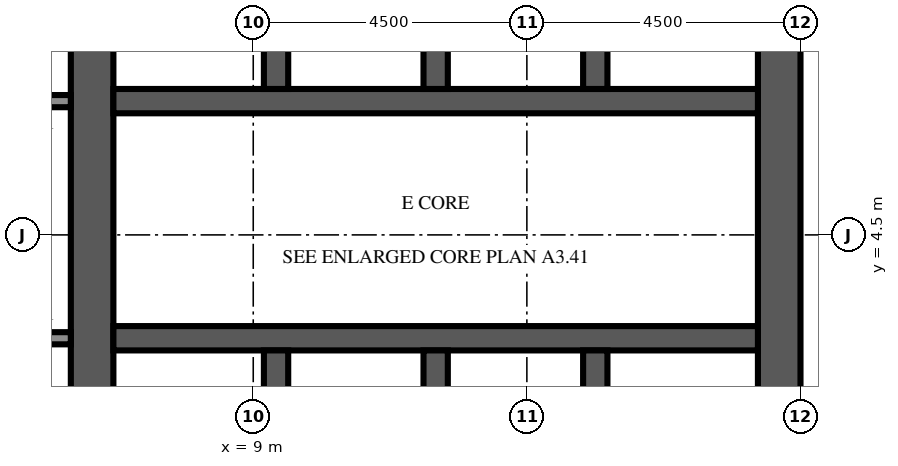
"""IFC4 building model, lengths in metres.
Left out: names, types, materials, properties, quantities, classifications, styles, units other than length and angle.
Written with IfcOpenShell. Run it as: python <this file> out.ifc"""

import sys

from ifc_helpers import new_model, si_unit, direction, frame, frame_2d, origin, place, context, subcontext, project, spatial, rectangle, extrude, element, fill, save


model = new_model("IFC4")
c1 = context("Model", 3, precision=1e-05, world=origin(), true_north=direction((0.0, 1.0)))
c2 = subcontext(c1, "Body", "Model", "MODEL_VIEW")
j1 = project(units=[si_unit("LENGTHUNIT", "METRE"), si_unit("PLANEANGLEUNIT", "RADIAN")], contexts=[c1])
p1 = place(None, origin())
s1 = spatial("IfcSite", under=j1, at=p1, CompositionType="ELEMENT")
p2 = place(p1, origin())
s2 = spatial("IfcBuilding", under=s1, at=p2, CompositionType="ELEMENT")
p3 = place(p2, frame((0.0, 0.0, 282.7)))
s3 = spatial("IfcBuildingStorey", under=s2, at=p3, CompositionType="ELEMENT", Elevation=282.7)
p4 = place(p3, frame((6.35, -9.0, 0.0), z_axis=(0.0, 0.0, 1.0), x_axis=(0.0, 1.0, 0.0)))
e1 = element("IfcWall", 1, at=p4, inside=s3, PredefinedType="SHEAR", context=c2, shape_type="SweptSolid", body=[
    extrude(rectangle(XDim=27.5, YDim=0.7, at=frame_2d((13.75, 0.0))), origin(), (0.0, 0.0, 1.0), 4.1),
])
p5 = place(p4, frame((12.55, 0.0, 0.0)))
e2 = element("IfcOpeningElement", 2, at=p5, cuts=e1, PredefinedType="OPENING", context=c2, shape_type="SweptSolid", body=[
    extrude(rectangle(XDim=2.4, YDim=2.4, at=frame_2d((1.2, 1.2))), frame((0.0, 0.36, 0.0), z_axis=(0.0, -1.0, 0.0), x_axis=(1.0, 0.0, 0.0)), (0.0, 0.0, 1.0), 0.72),
])
p6 = place(p4, frame((3.9, 0.0, 0.0)))
e3 = element("IfcOpeningElement", 3, at=p6, cuts=e1, PredefinedType="OPENING", context=c2, shape_type="SweptSolid", body=[
    extrude(rectangle(XDim=1.2, YDim=2.1, at=frame_2d((0.6, 1.05))), frame((0.0, 0.36, 0.0), z_axis=(0.0, -1.0, 0.0), x_axis=(1.0, 0.0, 0.0)), (0.0, 0.0, 1.0), 0.72),
])
p7 = place(p4, frame((22.4, 0.0, 0.0)))
e4 = element("IfcOpeningElement", 4, at=p7, cuts=e1, PredefinedType="OPENING", context=c2, shape_type="SweptSolid", body=[
    extrude(rectangle(XDim=1.2, YDim=2.1, at=frame_2d((0.6, 1.05))), frame((0.0, 0.36, 0.0), z_axis=(0.0, -1.0, 0.0), x_axis=(1.0, 0.0, 0.0)), (0.0, 0.0, 1.0), 0.72),
])
p8 = place(p3, frame((17.65, -9.0, 0.0), z_axis=(0.0, 0.0, 1.0), x_axis=(0.0, 1.0, 0.0)))
e5 = element("IfcWall", 5, at=p8, inside=s3, PredefinedType="SHEAR", context=c2, shape_type="SweptSolid", body=[
    extrude(rectangle(XDim=27.5, YDim=0.7, at=frame_2d((13.75, 0.0))), origin(), (0.0, 0.0, 1.0), 4.1),
])
p9 = place(p8, frame((12.55, 0.0, 0.0)))
e6 = element("IfcOpeningElement", 6, at=p9, cuts=e5, PredefinedType="OPENING", context=c2, shape_type="SweptSolid", body=[
    extrude(rectangle(XDim=2.4, YDim=2.4, at=frame_2d((1.2, 1.2))), frame((0.0, 0.36, 0.0), z_axis=(0.0, -1.0, 0.0), x_axis=(1.0, 0.0, 0.0)), (0.0, 0.0, 1.0), 0.72),
])
p10 = place(p8, frame((6.825, 0.0, 0.0)))
e7 = element("IfcOpeningElement", 7, at=p10, cuts=e5, PredefinedType="OPENING", context=c2, shape_type="SweptSolid", body=[
    extrude(rectangle(XDim=1.2, YDim=2.1, at=frame_2d((0.6, 1.05))), frame((0.0, 0.36, 0.0), z_axis=(0.0, -1.0, 0.0), x_axis=(1.0, 0.0, 0.0)), (0.0, 0.0, 1.0), 0.72),
])
p11 = place(p8, frame((19.475, 0.0, 0.0)))
e8 = element("IfcOpeningElement", 8, at=p11, cuts=e5, PredefinedType="OPENING", context=c2, shape_type="SweptSolid", body=[
    extrude(rectangle(XDim=1.2, YDim=2.1, at=frame_2d((0.6, 1.05))), frame((0.0, 0.36, 0.0), z_axis=(0.0, -1.0, 0.0), x_axis=(1.0, 0.0, 0.0)), (0.0, 0.0, 1.0), 0.72),
])
p12 = place(p3, frame((6.7, 2.8, 0.0), z_axis=(0.0, 0.0, 1.0), x_axis=(1.0, 0.0, 0.0)))
e9 = element("IfcWall", 9, at=p12, inside=s3, PredefinedType="SHEAR", context=c2, shape_type="SweptSolid", body=[
    extrude(rectangle(XDim=10.6, YDim=0.4, at=frame_2d((5.3, 0.0))), origin(), (0.0, 0.0, 1.0), 4.1),
])
p13 = place(p12, frame((0.688, 0.0, 0.0)))
e10 = element("IfcOpeningElement", 10, at=p13, cuts=e9, PredefinedType="OPENING", context=c2, shape_type="SweptSolid", body=[
    extrude(rectangle(XDim=1.1, YDim=2.1, at=frame_2d((0.55, 1.05))), frame((0.0, 0.21, 0.0), z_axis=(0.0, -1.0, 0.0), x_axis=(1.0, 0.0, 0.0)), (0.0, 0.0, 1.0), 0.42),
])
p14 = place(p12, frame((3.438, 0.0, 0.0)))
e11 = element("IfcOpeningElement", 11, at=p14, cuts=e9, PredefinedType="OPENING", context=c2, shape_type="SweptSolid", body=[
    extrude(rectangle(XDim=1.1, YDim=2.1, at=frame_2d((0.55, 1.05))), frame((0.0, 0.21, 0.0), z_axis=(0.0, -1.0, 0.0), x_axis=(1.0, 0.0, 0.0)), (0.0, 0.0, 1.0), 0.42),
])
p15 = place(p12, frame((6.113, 0.0, 0.0)))
e12 = element("IfcOpeningElement", 12, at=p15, cuts=e9, PredefinedType="OPENING", context=c2, shape_type="SweptSolid", body=[
    extrude(rectangle(XDim=1.0, YDim=2.1, at=frame_2d((0.5, 1.05))), frame((0.0, 0.21, 0.0), z_axis=(0.0, -1.0, 0.0), x_axis=(1.0, 0.0, 0.0)), (0.0, 0.0, 1.0), 0.42),
])
p16 = place(p12, frame((8.863, 0.0, 0.0)))
e13 = element("IfcOpeningElement", 13, at=p16, cuts=e9, PredefinedType="OPENING", context=c2, shape_type="SweptSolid", body=[
    extrude(rectangle(XDim=1.0, YDim=2.1, at=frame_2d((0.5, 1.05))), frame((0.0, 0.21, 0.0), z_axis=(0.0, -1.0, 0.0), x_axis=(1.0, 0.0, 0.0)), (0.0, 0.0, 1.0), 0.42),
])
p17 = place(p3, frame((6.7, 6.7, 0.0), z_axis=(0.0, 0.0, 1.0), x_axis=(1.0, 0.0, 0.0)))
e14 = element("IfcWall", 14, at=p17, inside=s3, PredefinedType="SHEAR", context=c2, shape_type="SweptSolid", body=[
    extrude(rectangle(XDim=10.6, YDim=0.4, at=frame_2d((5.3, 0.0))), origin(), (0.0, 0.0, 1.0), 4.1),
])
p18 = place(p17, frame((3.438, 0.0, 0.0)))
e15 = element("IfcOpeningElement", 15, at=p18, cuts=e14, PredefinedType="OPENING", context=c2, shape_type="SweptSolid", body=[
    extrude(rectangle(XDim=1.1, YDim=2.1, at=frame_2d((0.55, 1.05))), frame((0.0, 0.21, 0.0), z_axis=(0.0, -1.0, 0.0), x_axis=(1.0, 0.0, 0.0)), (0.0, 0.0, 1.0), 0.42),
])
p19 = place(p17, frame((6.062, 0.0, 0.0)))
e16 = element("IfcOpeningElement", 16, at=p19, cuts=e14, PredefinedType="OPENING", context=c2, shape_type="SweptSolid", body=[
    extrude(rectangle(XDim=1.1, YDim=2.1, at=frame_2d((0.55, 1.05))), frame((0.0, 0.21, 0.0), z_axis=(0.0, -1.0, 0.0), x_axis=(1.0, 0.0, 0.0)), (0.0, 0.0, 1.0), 0.42),
])
p20 = place(p17, frame((8.812, 0.0, 0.0)))
e17 = element("IfcOpeningElement", 17, at=p20, cuts=e14, PredefinedType="OPENING", context=c2, shape_type="SweptSolid", body=[
    extrude(rectangle(XDim=1.1, YDim=2.1, at=frame_2d((0.55, 1.05))), frame((0.0, 0.21, 0.0), z_axis=(0.0, -1.0, 0.0), x_axis=(1.0, 0.0, 0.0)), (0.0, 0.0, 1.0), 0.42),
])
p21 = place(p17, frame((0.738, 0.0, 0.0)))
e18 = element("IfcOpeningElement", 18, at=p21, cuts=e14, PredefinedType="OPENING", context=c2, shape_type="SweptSolid", body=[
    extrude(rectangle(XDim=1.0, YDim=2.1, at=frame_2d((0.5, 1.05))), frame((0.0, 0.21, 0.0), z_axis=(0.0, -1.0, 0.0), x_axis=(1.0, 0.0, 0.0)), (0.0, 0.0, 1.0), 0.42),
])
for number, where, z_axis, x_axis in (
    (19, (9.375, -0.3, 0.0), (0.0, 0.0, 1.0), (0.0, 1.0, 0.0)),
    (20, (9.375, 6.9, 0.0), (0.0, 0.0, 1.0), (0.0, 1.0, 0.0)),
    (21, (12.0, -0.3, 0.0), (0.0, 0.0, 1.0), (0.0, 1.0, 0.0)),
    (22, (12.0, 6.9, 0.0), (0.0, 0.0, 1.0), (0.0, 1.0, 0.0)),
    (23, (14.625, -0.3, 0.0), (0.0, 0.0, 1.0), (0.0, 1.0, 0.0)),
    (24, (14.625, 6.9, 0.0), (0.0, 0.0, 1.0), (0.0, 1.0, 0.0)),
):
    element("IfcWall", number, at=place(p3, frame(where, z_axis=z_axis, x_axis=x_axis)), inside=s3, PredefinedType="SHEAR", context=c2, shape_type="SweptSolid", body=[
        extrude(rectangle(XDim=2.9, YDim=0.4, at=frame_2d((1.45, 0.0))), origin(), (0.0, 0.0, 1.0), 4.1),
    ])
for number, where, z_axis, x_axis in (
    (25, (4.5, 2.8, 0.0), (0.0, 0.0, 1.0), (1.0, 0.0, 0.0)),
    (26, (4.5, 6.7, 0.0), (0.0, 0.0, 1.0), (1.0, 0.0, 0.0)),
):
    element("IfcWall", number, at=place(p3, frame(where, z_axis=z_axis, x_axis=x_axis)), inside=s3, PredefinedType="PARTITIONING", context=c2, shape_type="SweptSolid", body=[
        extrude(rectangle(XDim=1.5, YDim=0.2, at=frame_2d((0.75, 0.0))), origin(), (0.0, 0.0, 1.0), 3.65),
    ])
p22 = place(p13, origin())
e27 = element("IfcDoor", 27, at=p22, inside=s3, OperationType="DOUBLE_DOOR_SLIDING", PredefinedType="DOOR", context=c2, shape_type="SweptSolid", body=[
    extrude(rectangle(XDim=1.1, YDim=2.1, at=frame_2d((0.55, 1.05))), frame((0.0, 0.025, 0.0), z_axis=(0.0, -1.0, 0.0), x_axis=(1.0, 0.0, 0.0)), (0.0, 0.0, 1.0), 0.05),
])
fill(e10, e27)
p23 = place(p14, origin())
e28 = element("IfcDoor", 28, at=p23, inside=s3, OperationType="DOUBLE_DOOR_SLIDING", PredefinedType="DOOR", context=c2, shape_type="SweptSolid", body=[
    extrude(rectangle(XDim=1.1, YDim=2.1, at=frame_2d((0.55, 1.05))), frame((0.0, 0.025, 0.0), z_axis=(0.0, -1.0, 0.0), x_axis=(1.0, 0.0, 0.0)), (0.0, 0.0, 1.0), 0.05),
])
fill(e11, e28)
p24 = place(p18, origin())
e29 = element("IfcDoor", 29, at=p24, inside=s3, OperationType="DOUBLE_DOOR_SLIDING", PredefinedType="DOOR", context=c2, shape_type="SweptSolid", body=[
    extrude(rectangle(XDim=1.1, YDim=2.1, at=frame_2d((0.55, 1.05))), frame((0.0, 0.025, 0.0), z_axis=(0.0, -1.0, 0.0), x_axis=(1.0, 0.0, 0.0)), (0.0, 0.0, 1.0), 0.05),
])
fill(e15, e29)
p25 = place(p19, origin())
e30 = element("IfcDoor", 30, at=p25, inside=s3, OperationType="DOUBLE_DOOR_SLIDING", PredefinedType="DOOR", context=c2, shape_type="SweptSolid", body=[
    extrude(rectangle(XDim=1.1, YDim=2.1, at=frame_2d((0.55, 1.05))), frame((0.0, 0.025, 0.0), z_axis=(0.0, -1.0, 0.0), x_axis=(1.0, 0.0, 0.0)), (0.0, 0.0, 1.0), 0.05),
])
fill(e16, e30)
p26 = place(p20, origin())
e31 = element("IfcDoor", 31, at=p26, inside=s3, OperationType="DOUBLE_DOOR_SLIDING", PredefinedType="DOOR", context=c2, shape_type="SweptSolid", body=[
    extrude(rectangle(XDim=1.1, YDim=2.1, at=frame_2d((0.55, 1.05))), frame((0.0, 0.025, 0.0), z_axis=(0.0, -1.0, 0.0), x_axis=(1.0, 0.0, 0.0)), (0.0, 0.0, 1.0), 0.05),
])
fill(e17, e31)
p27 = place(p5, origin())
e32 = element("IfcDoor", 32, at=p27, inside=s3, OperationType="DOUBLE_DOOR_DOUBLE_SWING", PredefinedType="DOOR", context=c2, shape_type="SweptSolid", body=[
    extrude(rectangle(XDim=2.4, YDim=2.4, at=frame_2d((1.2, 1.2))), frame((0.0, 0.025, 0.0), z_axis=(0.0, -1.0, 0.0), x_axis=(1.0, 0.0, 0.0)), (0.0, 0.0, 1.0), 0.05),
])
fill(e2, e32)
p28 = place(p9, origin())
e33 = element("IfcDoor", 33, at=p28, inside=s3, OperationType="DOUBLE_DOOR_DOUBLE_SWING", PredefinedType="DOOR", context=c2, shape_type="SweptSolid", body=[
    extrude(rectangle(XDim=2.4, YDim=2.4, at=frame_2d((1.2, 1.2))), frame((0.0, 0.025, 0.0), z_axis=(0.0, -1.0, 0.0), x_axis=(1.0, 0.0, 0.0)), (0.0, 0.0, 1.0), 0.05),
])
fill(e6, e33)
p29 = place(p15, origin())
e34 = element("IfcDoor", 34, at=p29, inside=s3, OperationType="SINGLE_SWING_LEFT", PredefinedType="DOOR", context=c2, shape_type="SweptSolid", body=[
    extrude(rectangle(XDim=1.0, YDim=2.1, at=frame_2d((0.5, 1.05))), frame((0.0, 0.025, 0.0), z_axis=(0.0, -1.0, 0.0), x_axis=(1.0, 0.0, 0.0)), (0.0, 0.0, 1.0), 0.05),
])
fill(e12, e34)
p30 = place(p16, origin())
e35 = element("IfcDoor", 35, at=p30, inside=s3, OperationType="SINGLE_SWING_RIGHT", PredefinedType="DOOR", context=c2, shape_type="SweptSolid", body=[
    extrude(rectangle(XDim=1.0, YDim=2.1, at=frame_2d((0.5, 1.05))), frame((0.0, 0.025, 0.0), z_axis=(0.0, -1.0, 0.0), x_axis=(1.0, 0.0, 0.0)), (0.0, 0.0, 1.0), 0.05),
])
fill(e13, e35)
p31 = place(p21, origin())
e36 = element("IfcDoor", 36, at=p31, inside=s3, OperationType="SINGLE_SWING_LEFT", PredefinedType="DOOR", context=c2, shape_type="SweptSolid", body=[
    extrude(rectangle(XDim=1.0, YDim=2.1, at=frame_2d((0.5, 1.05))), frame((0.0, 0.025, 0.0), z_axis=(0.0, -1.0, 0.0), x_axis=(1.0, 0.0, 0.0)), (0.0, 0.0, 1.0), 0.05),
])
fill(e18, e36)
save(model, sys.argv[1])
